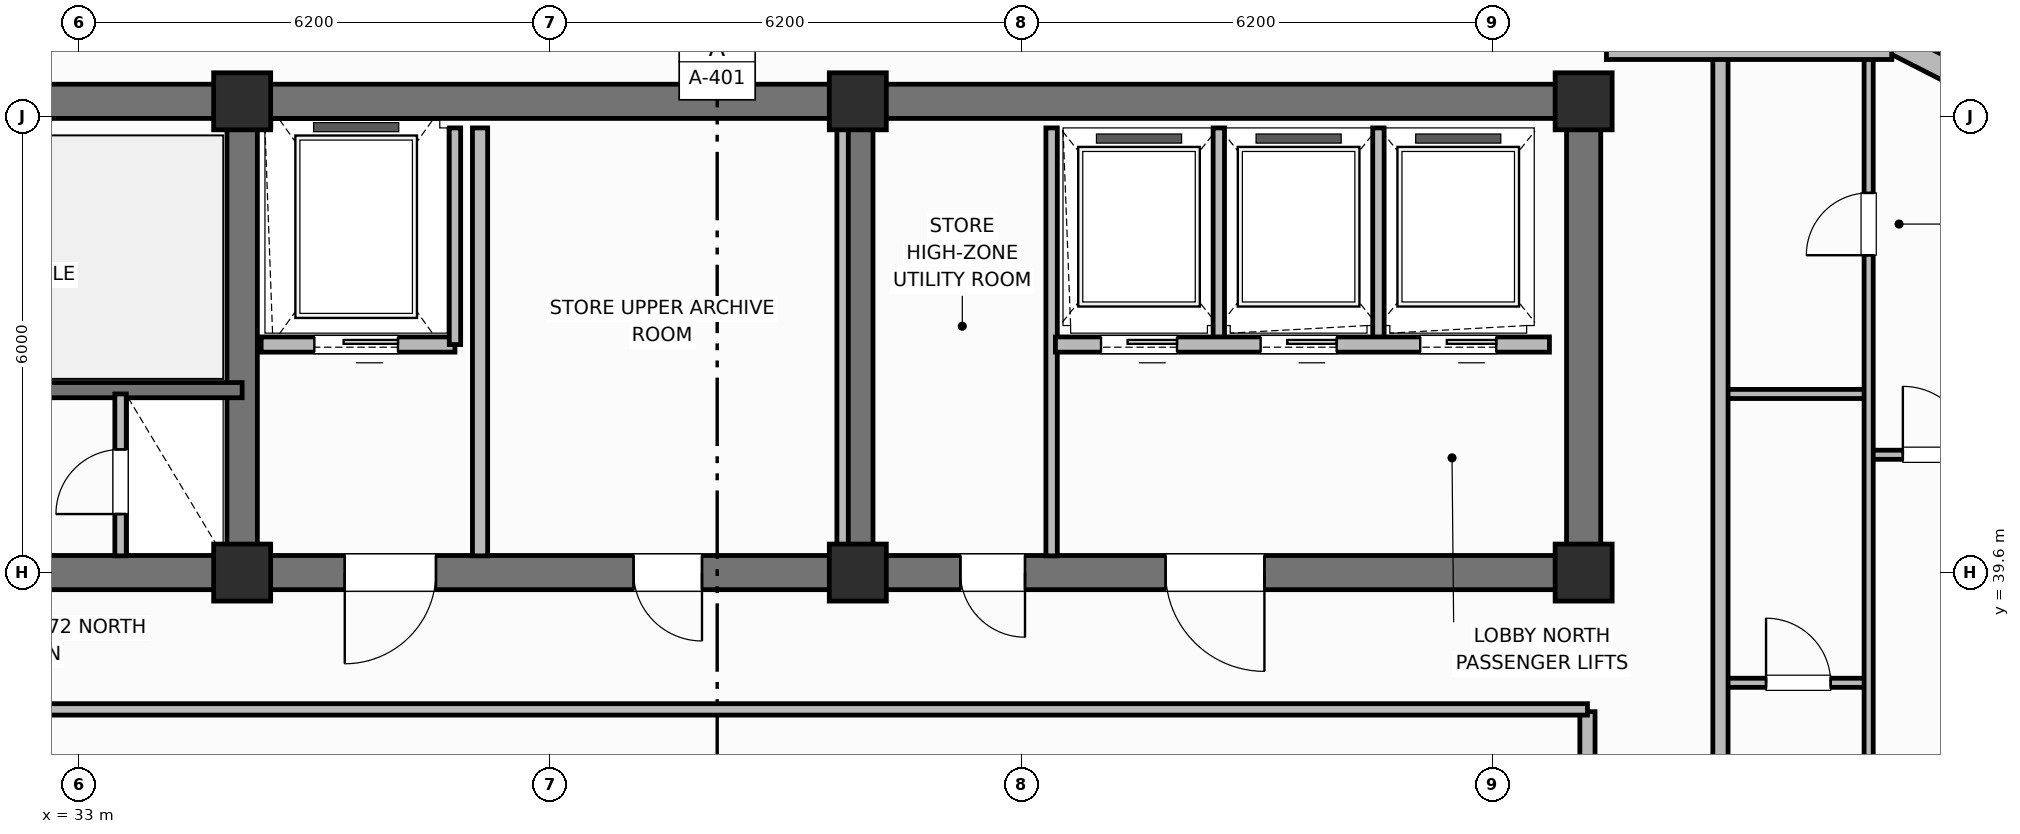
"""IFC4 building model, lengths in metres.
Left out: names, types, materials, properties, quantities, classifications, styles, units other than length and angle.
Written with IfcOpenShell. Run it as: python <this file> out.ifc"""

import sys

from ifc_helpers import new_model, si_unit, direction, frame, frame_2d, origin, origin_2d, place, context, subcontext, project, spatial, rectangle, extrude, element, fill, save


model = new_model("IFC4")
c1 = context("Model", 3, precision=1e-05, world=origin(), true_north=direction((0.0, 1.0)))
c2 = subcontext(c1, "Body", "Model", "MODEL_VIEW")
j1 = project(units=[si_unit("LENGTHUNIT", "METRE"), si_unit("PLANEANGLEUNIT", "RADIAN")], contexts=[c1])
p1 = place(None, origin())
s1 = spatial("IfcSite", under=j1, at=p1, CompositionType="ELEMENT")
p2 = place(p1, origin())
s2 = spatial("IfcBuilding", under=s1, at=p2, CompositionType="ELEMENT")
p3 = place(p2, frame((0.0, 0.0, 286.1)))
s3 = spatial("IfcBuildingStorey", under=s2, at=p3, CompositionType="ELEMENT", Elevation=286.1)
p4 = place(p3, frame((25.6, 45.8, 0.0), z_axis=(0.0, 0.0, 1.0), x_axis=(1.0, 0.0, 0.0)))
e1 = element("IfcWall", 1, at=p4, inside=s3, PredefinedType="SHEAR", context=c2, shape_type="SweptSolid", body=[
    extrude(rectangle(XDim=27.2, YDim=0.45, at=frame_2d((13.6, 0.0))), origin(), (0.0, 0.0, 1.0), 3.7),
])
p5 = place(p3, frame((52.8, 39.825, 0.0), z_axis=(0.0, 0.0, 1.0), x_axis=(0.0, 1.0, 0.0)))
e2 = element("IfcWall", 2, at=p5, inside=s3, PredefinedType="SHEAR", context=c2, shape_type="SweptSolid", body=[
    extrude(rectangle(XDim=5.75, YDim=0.45, at=frame_2d((2.875, 0.0))), origin(), (0.0, 0.0, 1.0), 3.7),
])
p6 = place(p3, frame((52.8, 39.6, 0.0), z_axis=(0.0, 0.0, 1.0), x_axis=(-1.0, 0.0, 0.0)))
e3 = element("IfcWall", 3, at=p6, inside=s3, PredefinedType="SHEAR", context=c2, shape_type="SweptSolid", body=[
    extrude(rectangle(XDim=27.2, YDim=0.45, at=frame_2d((13.6, 0.0))), origin(), (0.0, 0.0, 1.0), 3.7),
])
p7 = place(p6, frame((24.2, 0.0, 0.0)))
e4 = element("IfcOpeningElement", 4, at=p7, cuts=e3, PredefinedType="OPENING", context=c2, shape_type="SweptSolid", body=[
    extrude(rectangle(XDim=1.1, YDim=2.15, at=frame_2d((0.55, 1.075))), frame((0.0, 0.235, 0.0), z_axis=(0.0, -1.0, 0.0), x_axis=(1.0, 0.0, 0.0)), (0.0, 0.0, 1.0), 0.47),
])
p8 = place(p6, frame((15.1, 0.0, 0.0)))
e5 = element("IfcOpeningElement", 5, at=p8, cuts=e3, PredefinedType="OPENING", context=c2, shape_type="SweptSolid", body=[
    extrude(rectangle(XDim=1.2, YDim=2.15, at=frame_2d((0.6, 1.075))), frame((0.0, 0.235, 0.0), z_axis=(0.0, -1.0, 0.0), x_axis=(1.0, 0.0, 0.0)), (0.0, 0.0, 1.0), 0.47),
])
p9 = place(p6, frame((11.6, 0.0, 0.0)))
e6 = element("IfcOpeningElement", 6, at=p9, cuts=e3, PredefinedType="OPENING", context=c2, shape_type="SweptSolid", body=[
    extrude(rectangle(XDim=0.9, YDim=2.1, at=frame_2d((0.45, 1.05))), frame((0.0, 0.235, 0.0), z_axis=(0.0, -1.0, 0.0), x_axis=(1.0, 0.0, 0.0)), (0.0, 0.0, 1.0), 0.47),
])
p10 = place(p6, frame((7.35, 0.0, 0.0)))
e7 = element("IfcOpeningElement", 7, at=p10, cuts=e3, PredefinedType="OPENING", context=c2, shape_type="SweptSolid", body=[
    extrude(rectangle(XDim=0.85, YDim=2.1, at=frame_2d((0.425, 1.05))), frame((0.0, 0.235, 0.0), z_axis=(0.0, -1.0, 0.0), x_axis=(1.0, 0.0, 0.0)), (0.0, 0.0, 1.0), 0.47),
])
p11 = place(p6, frame((4.2, 0.0, 0.0)))
e8 = element("IfcOpeningElement", 8, at=p11, cuts=e3, PredefinedType="OPENING", context=c2, shape_type="SweptSolid", body=[
    extrude(rectangle(XDim=1.3, YDim=2.2, at=frame_2d((0.65, 1.1))), frame((0.0, 0.235, 0.0), z_axis=(0.0, -1.0, 0.0), x_axis=(1.0, 0.0, 0.0)), (0.0, 0.0, 1.0), 0.47),
])
for number, where, z_axis, x_axis in (
    (9, (35.15, 39.825, 0.0), (0.0, 0.0, 1.0), (0.0, 1.0, 0.0)),
    (10, (43.25, 39.825, 0.0), (0.0, 0.0, 1.0), (0.0, 1.0, 0.0)),
):
    element("IfcWall", number, at=place(p3, frame(where, z_axis=z_axis, x_axis=x_axis)), inside=s3, PredefinedType="SHEAR", context=c2, shape_type="SweptSolid", body=[
        extrude(rectangle(XDim=5.75, YDim=0.4, at=frame_2d((2.875, 0.0))), origin(), (0.0, 0.0, 1.0), 3.7),
    ])
for number, where, z_axis, x_axis in (
    (11, (35.15, 39.6, 0.0), (0.0, 0.0, 1.0), (1.0, 0.0, 0.0)),
    (12, (35.15, 45.8, 0.0), (0.0, 0.0, 1.0), (1.0, 0.0, 0.0)),
    (13, (43.25, 39.6, 0.0), (0.0, 0.0, 1.0), (1.0, 0.0, 0.0)),
    (14, (43.25, 45.8, 0.0), (0.0, 0.0, 1.0), (1.0, 0.0, 0.0)),
    (15, (52.8, 39.6, 0.0), (0.0, 0.0, 1.0), (1.0, 0.0, 0.0)),
    (16, (52.8, 45.8, 0.0), (0.0, 0.0, 1.0), (1.0, 0.0, 0.0)),
):
    element("IfcColumn", number, at=place(p3, frame(where, z_axis=z_axis, x_axis=x_axis)), inside=s3, PredefinedType="COLUMN", context=c2, shape_type="SweptSolid", body=[
        extrude(rectangle(XDim=0.75, YDim=0.75, at=origin_2d()), origin(), (0.0, 0.0, 1.0), 3.7),
    ])
p12 = place(p3, frame((57.633, 46.188, 0.0), z_axis=(0.0, 0.0, 1.0), x_axis=(-0.891076589373, 0.453852962833, 0.0)))
e17 = element("IfcWall", 17, at=p12, inside=s3, PredefinedType="SOLIDWALL", context=c2, shape_type="SweptSolid", body=[
    extrude(rectangle(XDim=0.954, YDim=0.3, at=frame_2d((0.477, 0.0))), origin(), (0.0, 0.0, 1.0), 2.73),
])
p13 = place(p3, frame((35.15, 42.0, 0.0), z_axis=(0.0, 0.0, 1.0), x_axis=(-1.0, 0.0, 0.0)))
e18 = element("IfcWall", 18, at=p13, inside=s3, PredefinedType="SHEAR", context=c2, shape_type="SweptSolid", body=[
    extrude(rectangle(XDim=9.55, YDim=0.2, at=frame_2d((4.775, 0.0))), origin(), (0.0, 0.0, 1.0), 3.7),
])
p14 = place(p13, frame((7.25, 0.0, 0.0)))
e19 = element("IfcOpeningElement", 19, at=p14, cuts=e18, PredefinedType="OPENING", context=c2, shape_type="SweptSolid", body=[
    extrude(rectangle(XDim=1.1, YDim=2.15, at=frame_2d((0.55, 1.075))), frame((0.0, 0.11, 0.0), z_axis=(0.0, -1.0, 0.0), x_axis=(1.0, 0.0, 0.0)), (0.0, 0.0, 1.0), 0.22),
])
p15 = place(p3, frame((33.55, 39.82, 0.0), z_axis=(0.0, 0.0, 1.0), x_axis=(0.0, 1.0, 0.0)))
e20 = element("IfcWall", 20, at=p15, inside=s3, PredefinedType="PARTITIONING", context=c2, shape_type="SweptSolid", body=[
    extrude(rectangle(XDim=2.13, YDim=0.15, at=frame_2d((1.065, 0.0))), origin(), (0.0, 0.0, 1.0), 2.56),
])
p16 = place(p15, frame((0.55, 0.0, 0.0)))
e21 = element("IfcOpeningElement", 21, at=p16, cuts=e20, PredefinedType="OPENING", context=c2, shape_type="SweptSolid", body=[
    extrude(rectangle(XDim=0.85, YDim=2.05, at=frame_2d((0.425, 1.025))), frame((0.0, 0.085, 0.0), z_axis=(0.0, -1.0, 0.0), x_axis=(1.0, 0.0, 0.0)), (0.0, 0.0, 1.0), 0.17),
])
p17 = place(p3, frame((37.95, 42.6, 0.0), z_axis=(0.0, 0.0, 1.0), x_axis=(-1.0, 0.0, 0.0)))
e22 = element("IfcWall", 22, at=p17, inside=s3, PredefinedType="PARTITIONING", context=c2, shape_type="SweptSolid", body=[
    extrude(rectangle(XDim=2.55, YDim=0.2, at=frame_2d((1.275, 0.0))), origin(), (0.0, 0.0, 1.0), 2.33),
])
p18 = place(p17, frame((0.75, 0.0, 0.0)))
e23 = element("IfcOpeningElement", 23, at=p18, cuts=e22, PredefinedType="OPENING", context=c2, shape_type="SweptSolid", body=[
    extrude(rectangle(XDim=1.1, YDim=2.15, at=frame_2d((0.55, 1.075))), frame((0.0, 0.11, 0.0), z_axis=(0.0, -1.0, 0.0), x_axis=(1.0, 0.0, 0.0)), (0.0, 0.0, 1.0), 0.22),
])
p19 = place(p3, frame((37.95, 42.6, 0.0), z_axis=(0.0, 0.0, 1.0), x_axis=(0.0, 1.0, 0.0)))
e24 = element("IfcWall", 24, at=p19, inside=s3, PredefinedType="PARTITIONING", context=c2, shape_type="SweptSolid", body=[
    extrude(rectangle(XDim=2.85, YDim=0.15, at=frame_2d((1.425, 0.0))), origin(), (0.0, 0.0, 1.0), 2.56),
])
p20 = place(p3, frame((38.28, 39.82, 0.0), z_axis=(0.0, 0.0, 1.0), x_axis=(0.0, 1.0, 0.0)))
e25 = element("IfcWall", 25, at=p20, inside=s3, PredefinedType="PARTITIONING", context=c2, shape_type="SweptSolid", body=[
    extrude(rectangle(XDim=5.63, YDim=0.2, at=frame_2d((2.815, 0.0))), origin(), (0.0, 0.0, 1.0), 2.56),
])
for number, where, z_axis, x_axis in (
    (26, (43.05, 39.82, 0.0), (0.0, 0.0, 1.0), (0.0, 1.0, 0.0)),
    (27, (45.8, 39.82, 0.0), (0.0, 0.0, 1.0), (0.0, 1.0, 0.0)),
):
    element("IfcWall", number, at=place(p3, frame(where, z_axis=z_axis, x_axis=x_axis)), inside=s3, PredefinedType="PARTITIONING", context=c2, shape_type="SweptSolid", body=[
        extrude(rectangle(XDim=5.63, YDim=0.15, at=frame_2d((2.815, 0.0))), origin(), (0.0, 0.0, 1.0), 2.56),
    ])
for number, where, z_axis, x_axis in (
    (28, (48.0, 42.65, 0.0), (0.0, 0.0, 1.0), (0.0, 1.0, 0.0)),
    (29, (50.1, 42.65, 0.0), (0.0, 0.0, 1.0), (0.0, 1.0, 0.0)),
):
    element("IfcWall", number, at=place(p3, frame(where, z_axis=z_axis, x_axis=x_axis)), inside=s3, PredefinedType="PARTITIONING", context=c2, shape_type="SweptSolid", body=[
        extrude(rectangle(XDim=2.8, YDim=0.15, at=frame_2d((1.4, 0.0))), origin(), (0.0, 0.0, 1.0), 2.56),
    ])
p21 = place(p3, frame((52.35, 42.6, 0.0), z_axis=(0.0, 0.0, 1.0), x_axis=(-1.0, 0.0, 0.0)))
e30 = element("IfcWall", 30, at=p21, inside=s3, PredefinedType="PARTITIONING", context=c2, shape_type="SweptSolid", body=[
    extrude(rectangle(XDim=6.5, YDim=0.2, at=frame_2d((3.25, 0.0))), origin(), (0.0, 0.0, 1.0), 2.56),
])
p22 = place(p21, frame((4.9, 0.0, 0.0)))
e31 = element("IfcOpeningElement", 31, at=p22, cuts=e30, PredefinedType="OPENING", context=c2, shape_type="SweptSolid", body=[
    extrude(rectangle(XDim=1.0, YDim=2.15, at=frame_2d((0.5, 1.075))), frame((0.0, 0.11, 0.0), z_axis=(0.0, -1.0, 0.0), x_axis=(1.0, 0.0, 0.0)), (0.0, 0.0, 1.0), 0.22),
])
p23 = place(p21, frame((2.8, 0.0, 0.0)))
e32 = element("IfcOpeningElement", 32, at=p23, cuts=e30, PredefinedType="OPENING", context=c2, shape_type="SweptSolid", body=[
    extrude(rectangle(XDim=1.0, YDim=2.15, at=frame_2d((0.5, 1.075))), frame((0.0, 0.11, 0.0), z_axis=(0.0, -1.0, 0.0), x_axis=(1.0, 0.0, 0.0)), (0.0, 0.0, 1.0), 0.22),
])
p24 = place(p21, frame((0.7, 0.0, 0.0)))
e33 = element("IfcOpeningElement", 33, at=p24, cuts=e30, PredefinedType="OPENING", context=c2, shape_type="SweptSolid", body=[
    extrude(rectangle(XDim=1.0, YDim=2.15, at=frame_2d((0.5, 1.075))), frame((0.0, 0.11, 0.0), z_axis=(0.0, -1.0, 0.0), x_axis=(1.0, 0.0, 0.0)), (0.0, 0.0, 1.0), 0.22),
])
p25 = place(p3, frame((52.85, 18.63, 0.0), z_axis=(0.0, 0.0, 1.0), x_axis=(0.0, 1.0, 0.0)))
e34 = element("IfcWall", 34, at=p25, inside=s3, PredefinedType="PARTITIONING", context=c2, shape_type="SweptSolid", body=[
    extrude(rectangle(XDim=19.14, YDim=0.2, at=frame_2d((9.57, 0.0))), origin(), (0.0, 0.0, 1.0), 2.56),
])
p26 = place(p3, frame((29.9, 37.8, 0.0), z_axis=(0.0, 0.0, 1.0), x_axis=(1.0, 0.0, 0.0)))
e35 = element("IfcWall", 35, at=p26, inside=s3, PredefinedType="PARTITIONING", context=c2, shape_type="SweptSolid", body=[
    extrude(rectangle(XDim=22.95, YDim=0.15, at=frame_2d((11.475, 0.0))), origin(), (0.0, 0.0, 1.0), 2.56),
])
p27 = place(p3, frame((54.6, 38.15, 0.0), z_axis=(0.0, 0.0, 1.0), x_axis=(1.0, 0.0, 0.0)))
e36 = element("IfcWall", 36, at=p27, inside=s3, PredefinedType="PARTITIONING", context=c2, shape_type="SweptSolid", body=[
    extrude(rectangle(XDim=1.95, YDim=0.12, at=frame_2d((0.975, 0.0))), origin(), (0.0, 0.0, 1.0), 2.56),
])
p28 = place(p27, frame((0.6, 0.0, 0.0)))
e37 = element("IfcOpeningElement", 37, at=p28, cuts=e36, PredefinedType="OPENING", context=c2, shape_type="SweptSolid", body=[
    extrude(rectangle(XDim=0.85, YDim=2.1, at=frame_2d((0.425, 1.05))), frame((0.0, 0.07, 0.0), z_axis=(0.0, -1.0, 0.0), x_axis=(1.0, 0.0, 0.0)), (0.0, 0.0, 1.0), 0.14),
])
p29 = place(p3, frame((54.6, 41.95, 0.0), z_axis=(0.0, 0.0, 1.0), x_axis=(1.0, 0.0, 0.0)))
e38 = element("IfcWall", 38, at=p29, inside=s3, PredefinedType="PARTITIONING", context=c2, shape_type="SweptSolid", body=[
    extrude(rectangle(XDim=1.95, YDim=0.12, at=frame_2d((0.975, 0.0))), origin(), (0.0, 0.0, 1.0), 2.56),
])
p30 = place(p3, frame((56.55, 41.15, 0.0), z_axis=(0.0, 0.0, 1.0), x_axis=(1.0, 0.0, 0.0)))
e39 = element("IfcWall", 39, at=p30, inside=s3, PredefinedType="PARTITIONING", context=c2, shape_type="SweptSolid", body=[
    extrude(rectangle(XDim=2.32, YDim=0.12, at=frame_2d((1.16, 0.0))), origin(), (0.0, 0.0, 1.0), 2.56),
])
p31 = place(p30, frame((0.45, 0.0, 0.0)))
e40 = element("IfcOpeningElement", 40, at=p31, cuts=e39, PredefinedType="OPENING", context=c2, shape_type="SweptSolid", body=[
    extrude(rectangle(XDim=0.9, YDim=2.1, at=frame_2d((0.45, 1.05))), frame((0.0, 0.07, 0.0), z_axis=(0.0, -1.0, 0.0), x_axis=(1.0, 0.0, 0.0)), (0.0, 0.0, 1.0), 0.14),
])
p32 = place(p3, frame((56.55, 32.79, 0.0), z_axis=(0.0, 0.0, 1.0), x_axis=(0.0, 1.0, 0.0)))
e41 = element("IfcWall", 41, at=p32, inside=s3, PredefinedType="PARTITIONING", context=c2, shape_type="SweptSolid", body=[
    extrude(rectangle(XDim=13.62, YDim=0.12, at=frame_2d((6.81, 0.0))), origin(), (0.0, 0.0, 1.0), 2.56),
])
p33 = place(p32, frame((0.61, 0.0, 0.0)))
e42 = element("IfcOpeningElement", 42, at=p33, cuts=e41, PredefinedType="OPENING", context=c2, shape_type="SweptSolid", body=[
    extrude(rectangle(XDim=0.9, YDim=2.1, at=frame_2d((0.45, 1.05))), frame((0.0, 0.07, 0.0), z_axis=(0.0, -1.0, 0.0), x_axis=(1.0, 0.0, 0.0)), (0.0, 0.0, 1.0), 0.14),
])
p34 = place(p32, frame((10.985, 0.0, 0.0)))
e43 = element("IfcOpeningElement", 43, at=p34, cuts=e41, PredefinedType="OPENING", context=c2, shape_type="SweptSolid", body=[
    extrude(rectangle(XDim=0.82, YDim=2.08, at=frame_2d((0.41, 1.04))), frame((0.0, 0.07, 0.0), z_axis=(0.0, -1.0, 0.0), x_axis=(1.0, 0.0, 0.0)), (0.0, 0.0, 1.0), 0.14),
])
p35 = place(p3, frame((54.6, 9.95, 0.0), z_axis=(0.0, 0.0, 1.0), x_axis=(0.0, 1.0, 0.0)))
e44 = element("IfcWall", 44, at=p35, inside=s3, PredefinedType="PARTITIONING", context=c2, shape_type="SweptSolid", body=[
    extrude(rectangle(XDim=36.5, YDim=0.2, at=frame_2d((18.25, 0.0))), origin(), (0.0, 0.0, 1.0), 2.56),
])
p36 = place(p35, frame((3.25, 0.0, 0.0)))
e45 = element("IfcOpeningElement", 45, at=p36, cuts=e44, PredefinedType="OPENING", context=c2, shape_type="SweptSolid", body=[
    extrude(rectangle(XDim=1.0, YDim=2.15, at=frame_2d((0.5, 1.075))), frame((0.0, 0.11, 0.0), z_axis=(0.0, -1.0, 0.0), x_axis=(1.0, 0.0, 0.0)), (0.0, 0.0, 1.0), 0.22),
])
p37 = place(p35, frame((23.5, 0.0, 0.0)))
e46 = element("IfcOpeningElement", 46, at=p37, cuts=e44, PredefinedType="OPENING", context=c2, shape_type="SweptSolid", body=[
    extrude(rectangle(XDim=1.0, YDim=2.15, at=frame_2d((0.5, 1.075))), frame((0.0, 0.11, 0.0), z_axis=(0.0, -1.0, 0.0), x_axis=(1.0, 0.0, 0.0)), (0.0, 0.0, 1.0), 0.22),
])
p38 = place(p3, frame((53.1, 46.45, 0.0), z_axis=(0.0, 0.0, 1.0), x_axis=(1.0, 0.0, 0.0)))
e47 = element("IfcWall", 47, at=p38, inside=s3, PredefinedType="PARTITIONING", context=c2, shape_type="SweptSolid", body=[
    extrude(rectangle(XDim=3.754, YDim=0.2, at=frame_2d((1.877, 0.0))), origin(), (0.0, 0.0, 1.0), 2.56),
])
p39 = place(p16, origin())
e48 = element("IfcDoor", 48, at=p39, inside=s3, OperationType="SINGLE_SWING_LEFT", PredefinedType="TRAPDOOR", context=c2, shape_type="SweptSolid", body=[
    extrude(rectangle(XDim=0.85, YDim=2.05, at=frame_2d((0.425, 1.025))), frame((0.0, 0.025, 0.0), z_axis=(0.0, -1.0, 0.0), x_axis=(1.0, 0.0, 0.0)), (0.0, 0.0, 1.0), 0.05),
])
fill(e21, e48)
p40 = place(p18, origin())
e49 = element("IfcDoor", 49, at=p40, inside=s3, OperationType="SLIDING_TO_LEFT", PredefinedType="DOOR", context=c2, shape_type="SweptSolid", body=[
    extrude(rectangle(XDim=1.1, YDim=2.15, at=frame_2d((0.55, 1.075))), frame((0.0, 0.025, 0.0), z_axis=(0.0, -1.0, 0.0), x_axis=(1.0, 0.0, 0.0)), (0.0, 0.0, 1.0), 0.05),
])
fill(e23, e49)
p41 = place(p22, origin())
e50 = element("IfcDoor", 50, at=p41, inside=s3, OperationType="SLIDING_TO_LEFT", PredefinedType="DOOR", context=c2, shape_type="SweptSolid", body=[
    extrude(rectangle(XDim=1.0, YDim=2.15, at=frame_2d((0.5, 1.075))), frame((0.0, 0.025, 0.0), z_axis=(0.0, -1.0, 0.0), x_axis=(1.0, 0.0, 0.0)), (0.0, 0.0, 1.0), 0.05),
])
fill(e31, e50)
p42 = place(p23, origin())
e51 = element("IfcDoor", 51, at=p42, inside=s3, OperationType="SLIDING_TO_LEFT", PredefinedType="DOOR", context=c2, shape_type="SweptSolid", body=[
    extrude(rectangle(XDim=1.0, YDim=2.15, at=frame_2d((0.5, 1.075))), frame((0.0, 0.025, 0.0), z_axis=(0.0, -1.0, 0.0), x_axis=(1.0, 0.0, 0.0)), (0.0, 0.0, 1.0), 0.05),
])
fill(e32, e51)
p43 = place(p24, origin())
e52 = element("IfcDoor", 52, at=p43, inside=s3, OperationType="SLIDING_TO_LEFT", PredefinedType="DOOR", context=c2, shape_type="SweptSolid", body=[
    extrude(rectangle(XDim=1.0, YDim=2.15, at=frame_2d((0.5, 1.075))), frame((0.0, 0.025, 0.0), z_axis=(0.0, -1.0, 0.0), x_axis=(1.0, 0.0, 0.0)), (0.0, 0.0, 1.0), 0.05),
])
fill(e33, e52)
p44 = place(p28, origin())
e53 = element("IfcDoor", 53, at=p44, inside=s3, OperationType="SINGLE_SWING_LEFT", PredefinedType="DOOR", context=c2, shape_type="SweptSolid", body=[
    extrude(rectangle(XDim=0.85, YDim=2.1, at=frame_2d((0.425, 1.05))), frame((0.0, 0.025, 0.0), z_axis=(0.0, -1.0, 0.0), x_axis=(1.0, 0.0, 0.0)), (0.0, 0.0, 1.0), 0.05),
])
fill(e37, e53)
p45 = place(p31, origin())
e54 = element("IfcDoor", 54, at=p45, inside=s3, OperationType="SINGLE_SWING_LEFT", PredefinedType="DOOR", context=c2, shape_type="SweptSolid", body=[
    extrude(rectangle(XDim=0.9, YDim=2.1, at=frame_2d((0.45, 1.05))), frame((0.0, 0.025, 0.0), z_axis=(0.0, -1.0, 0.0), x_axis=(1.0, 0.0, 0.0)), (0.0, 0.0, 1.0), 0.05),
])
fill(e40, e54)
p46 = place(p34, origin())
e55 = element("IfcDoor", 55, at=p46, inside=s3, OperationType="SINGLE_SWING_LEFT", PredefinedType="DOOR", context=c2, shape_type="SweptSolid", body=[
    extrude(rectangle(XDim=0.82, YDim=2.08, at=frame_2d((0.41, 1.04))), frame((0.0, 0.025, 0.0), z_axis=(0.0, -1.0, 0.0), x_axis=(1.0, 0.0, 0.0)), (0.0, 0.0, 1.0), 0.05),
])
fill(e43, e55)
p47 = place(p8, origin())
e56 = element("IfcDoor", 56, at=p47, inside=s3, OperationType="SINGLE_SWING_RIGHT", PredefinedType="DOOR", context=c2, shape_type="SweptSolid", body=[
    extrude(rectangle(XDim=1.2, YDim=2.15, at=frame_2d((0.6, 1.075))), frame((0.0, 0.025, 0.0), z_axis=(0.0, -1.0, 0.0), x_axis=(1.0, 0.0, 0.0)), (0.0, 0.0, 1.0), 0.05),
])
fill(e5, e56)
p48 = place(p9, origin())
e57 = element("IfcDoor", 57, at=p48, inside=s3, OperationType="SINGLE_SWING_LEFT", PredefinedType="DOOR", context=c2, shape_type="SweptSolid", body=[
    extrude(rectangle(XDim=0.9, YDim=2.1, at=frame_2d((0.45, 1.05))), frame((0.0, 0.025, 0.0), z_axis=(0.0, -1.0, 0.0), x_axis=(1.0, 0.0, 0.0)), (0.0, 0.0, 1.0), 0.05),
])
fill(e6, e57)
p49 = place(p10, origin())
e58 = element("IfcDoor", 58, at=p49, inside=s3, OperationType="SINGLE_SWING_LEFT", PredefinedType="DOOR", context=c2, shape_type="SweptSolid", body=[
    extrude(rectangle(XDim=0.85, YDim=2.1, at=frame_2d((0.425, 1.05))), frame((0.0, 0.025, 0.0), z_axis=(0.0, -1.0, 0.0), x_axis=(1.0, 0.0, 0.0)), (0.0, 0.0, 1.0), 0.05),
])
fill(e7, e58)
p50 = place(p11, origin())
e59 = element("IfcDoor", 59, at=p50, inside=s3, OperationType="SINGLE_SWING_LEFT", PredefinedType="DOOR", context=c2, shape_type="SweptSolid", body=[
    extrude(rectangle(XDim=1.3, YDim=2.2, at=frame_2d((0.65, 1.1))), frame((0.0, 0.025, 0.0), z_axis=(0.0, -1.0, 0.0), x_axis=(1.0, 0.0, 0.0)), (0.0, 0.0, 1.0), 0.05),
])
fill(e8, e59)
save(model, sys.argv[1])
